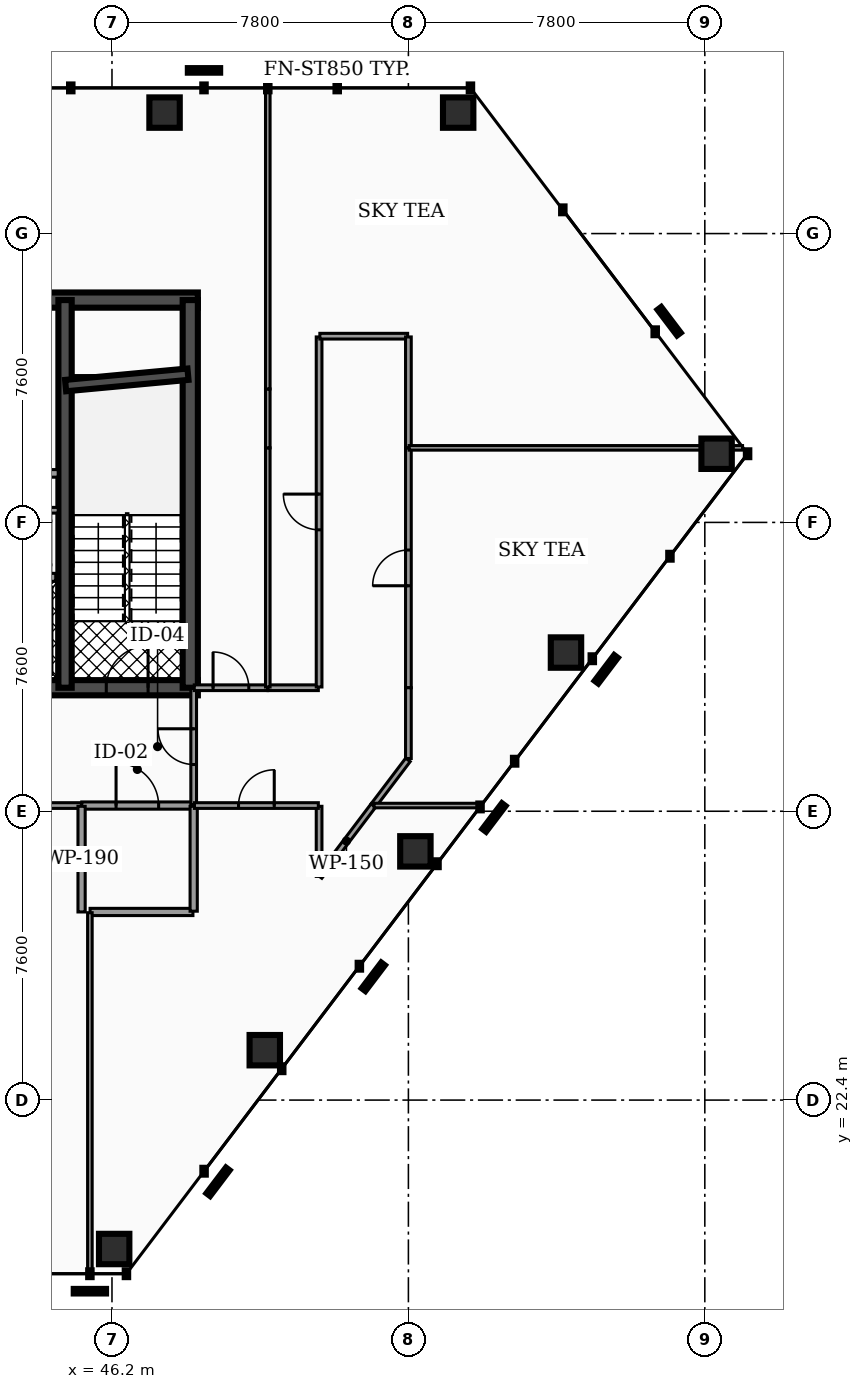
"""IFC4 building model, lengths in metres.
Left out: names, types, materials, properties, quantities, classifications, styles, units other than length and angle.
Written with IfcOpenShell. Run it as: python <this file> out.ifc"""

import sys

from ifc_helpers import new_model, si_unit, direction, frame, frame_2d, origin, origin_2d, place, context, subcontext, project, spatial, rectangle, hollow_rectangle, extrude, element, fill, save


model = new_model("IFC4")
c1 = context("Model", 3, precision=1e-05, world=origin(), true_north=direction((0.0, 1.0)))
c2 = subcontext(c1, "Body", "Model", "MODEL_VIEW")
j1 = project(units=[si_unit("LENGTHUNIT", "METRE"), si_unit("PLANEANGLEUNIT", "RADIAN")], contexts=[c1])
p1 = place(None, origin())
s1 = spatial("IfcSite", under=j1, at=p1, CompositionType="ELEMENT")
p2 = place(p1, origin())
s2 = spatial("IfcBuilding", under=s1, at=p2, CompositionType="ELEMENT")
p3 = place(p2, frame((0.0, 0.0, 149.6)))
s3 = spatial("IfcBuildingStorey", under=s2, at=p3, CompositionType="ELEMENT", Elevation=149.6)
p4 = place(p3, frame((28.4, 43.45, 0.0), z_axis=(0.0, 0.0, 1.0), x_axis=(1.0, 0.0, 0.0)))
e1 = element("IfcWall", 1, at=p4, inside=s3, PredefinedType="SHEAR", context=c2, shape_type="SweptSolid", body=[
    extrude(rectangle(XDim=20.06, YDim=0.4, at=frame_2d((10.03, 0.0))), origin(), (0.0, 0.0, 1.0), 3.5),
])
p5 = place(p3, frame((28.4, 33.25, 0.0), z_axis=(0.0, 0.0, 1.0), x_axis=(1.0, 0.0, 0.0)))
e2 = element("IfcWall", 2, at=p5, inside=s3, PredefinedType="SHEAR", context=c2, shape_type="SweptSolid", body=[
    extrude(rectangle(XDim=20.06, YDim=0.4, at=frame_2d((10.03, 0.0))), origin(), (0.0, 0.0, 1.0), 3.5),
])
p6 = place(p5, frame((4.03, 0.0, 0.0)))
e3 = element("IfcOpeningElement", 3, at=p6, cuts=e2, PredefinedType="OPENING", context=c2, shape_type="SweptSolid", body=[
    extrude(rectangle(XDim=1.1, YDim=2.15, at=frame_2d((0.55, 1.075))), frame((0.0, 0.21, 0.0), z_axis=(0.0, -1.0, 0.0), x_axis=(1.0, 0.0, 0.0)), (0.0, 0.0, 1.0), 0.42),
])
p7 = place(p5, frame((14.87, 0.0, 0.0)))
e4 = element("IfcOpeningElement", 4, at=p7, cuts=e2, PredefinedType="OPENING", context=c2, shape_type="SweptSolid", body=[
    extrude(rectangle(XDim=1.1, YDim=2.15, at=frame_2d((0.55, 1.075))), frame((0.0, 0.21, 0.0), z_axis=(0.0, -1.0, 0.0), x_axis=(1.0, 0.0, 0.0)), (0.0, 0.0, 1.0), 0.42),
])
p8 = place(p5, frame((5.95, 0.0, 0.0)))
e5 = element("IfcOpeningElement", 5, at=p8, cuts=e2, PredefinedType="OPENING", context=c2, shape_type="SweptSolid", body=[
    extrude(rectangle(XDim=1.0, YDim=2.1, at=frame_2d((0.5, 1.05))), frame((0.0, 0.21, 0.0), z_axis=(0.0, -1.0, 0.0), x_axis=(1.0, 0.0, 0.0)), (0.0, 0.0, 1.0), 0.42),
])
p9 = place(p5, frame((7.65, 0.0, 0.0)))
e6 = element("IfcOpeningElement", 6, at=p9, cuts=e2, PredefinedType="OPENING", context=c2, shape_type="SweptSolid", body=[
    extrude(rectangle(XDim=1.0, YDim=2.1, at=frame_2d((0.5, 1.05))), frame((0.0, 0.21, 0.0), z_axis=(0.0, -1.0, 0.0), x_axis=(1.0, 0.0, 0.0)), (0.0, 0.0, 1.0), 0.42),
])
p10 = place(p5, frame((1.31, 0.0, 0.0)))
e7 = element("IfcOpeningElement", 7, at=p10, cuts=e2, PredefinedType="OPENING", context=c2, shape_type="SweptSolid", body=[
    extrude(rectangle(XDim=1.1, YDim=2.2, at=frame_2d((0.55, 1.1))), frame((0.0, 0.21, 0.0), z_axis=(0.0, -1.0, 0.0), x_axis=(1.0, 0.0, 0.0)), (0.0, 0.0, 1.0), 0.42),
])
p11 = place(p5, frame((9.44, 0.0, 0.0)))
e8 = element("IfcOpeningElement", 8, at=p11, cuts=e2, PredefinedType="OPENING", context=c2, shape_type="SweptSolid", body=[
    extrude(rectangle(XDim=1.12, YDim=2.05, at=frame_2d((0.56, 1.025))), frame((0.0, 0.21, 0.0), z_axis=(0.0, -1.0, 0.0), x_axis=(1.0, 0.0, 0.0)), (0.0, 0.0, 1.0), 0.42),
])
p12 = place(p5, frame((17.65, 0.0, 0.0)))
e9 = element("IfcOpeningElement", 9, at=p12, cuts=e2, PredefinedType="OPENING", context=c2, shape_type="SweptSolid", body=[
    extrude(rectangle(XDim=1.1, YDim=2.2, at=frame_2d((0.55, 1.1))), frame((0.0, 0.21, 0.0), z_axis=(0.0, -1.0, 0.0), x_axis=(1.0, 0.0, 0.0)), (0.0, 0.0, 1.0), 0.42),
])
p13 = place(p3, frame((44.965, 33.25, 0.0), z_axis=(0.0, 0.0, 1.0), x_axis=(0.0, 1.0, 0.0)))
e10 = element("IfcWall", 10, at=p13, inside=s3, PredefinedType="SHEAR", context=c2, shape_type="SweptSolid", body=[
    extrude(rectangle(XDim=10.2, YDim=0.35, at=frame_2d((5.1, 0.0))), origin(), (0.0, 0.0, 1.0), 3.5),
])
p14 = place(p3, frame((48.26, 33.25, 0.0), z_axis=(0.0, 0.0, 1.0), x_axis=(0.0, 1.0, 0.0)))
e11 = element("IfcWall", 11, at=p14, inside=s3, PredefinedType="SHEAR", context=c2, shape_type="SweptSolid", body=[
    extrude(rectangle(XDim=10.2, YDim=0.4, at=frame_2d((5.1, 0.0))), origin(), (0.0, 0.0, 1.0), 3.5),
])
p15 = place(p3, frame((44.98, 41.2, 0.0), z_axis=(0.0, 0.0, 1.0), x_axis=(0.995686468965, 0.09278176286, 0.0)))
e12 = element("IfcWall", 12, at=p15, inside=s3, PredefinedType="SHEAR", context=c2, shape_type="SweptSolid", body=[
    extrude(rectangle(XDim=3.234, YDim=0.3, at=frame_2d((1.617, 0.0))), origin(), (0.0, 0.0, 1.0), 3.5),
])
for number, where, z_axis, x_axis in (
    (13, (55.31, 48.383, 0.0), (0.0, 0.0, 1.0), (1.0, 0.0, 0.0)),
    (14, (47.583, 48.383, 0.0), (0.0, 0.0, 1.0), (1.0, 0.0, 0.0)),
    (15, (46.258, 18.481, 0.0), (0.0, 0.0, 1.0), (1.0, 0.0, 0.0)),
    (16, (50.221, 23.713, 0.0), (0.0, 0.0, 1.0), (1.0, 0.0, 0.0)),
    (17, (54.184, 28.944, 0.0), (0.0, 0.0, 1.0), (1.0, 0.0, 0.0)),
    (18, (58.147, 34.176, 0.0), (0.0, 0.0, 1.0), (1.0, 0.0, 0.0)),
    (19, (62.11, 39.407, 0.0), (0.0, 0.0, 1.0), (1.0, 0.0, 0.0)),
):
    element("IfcColumn", number, at=place(p3, frame(where, z_axis=z_axis, x_axis=x_axis)), inside=s3, PredefinedType="COLUMN", context=c2, shape_type="SweptSolid", body=[
        extrude(hollow_rectangle(XDim=0.8, YDim=0.8, WallThickness=0.04, at=origin_2d()), origin(), (0.0, 0.0, 1.0), 3.5),
    ])
p16 = place(p3, frame((42.92, 36.155, 0.0), z_axis=(0.0, 0.0, 1.0), x_axis=(1.0, 0.0, 0.0)))
e20 = element("IfcWall", 20, at=p16, inside=s3, PredefinedType="SOLIDWALL", context=c2, shape_type="SweptSolid", body=[
    extrude(rectangle(XDim=1.8, YDim=0.21, at=frame_2d((0.9, 0.0))), origin(), (0.0, 0.0, 1.0), 2.472),
])
p17 = place(p3, frame((39.25, 38.89, 0.0), z_axis=(0.0, 0.0, 1.0), x_axis=(1.0, 0.0, 0.0)))
e21 = element("IfcWall", 21, at=p17, inside=s3, PredefinedType="PARTITIONING", context=c2, shape_type="SweptSolid", body=[
    extrude(rectangle(XDim=5.535, YDim=0.2, at=frame_2d((2.768, 0.0))), origin(), (0.0, 0.0, 1.0), 2.457),
])
p18 = place(p17, frame((2.327, 0.0, 0.0)))
e22 = element("IfcOpeningElement", 22, at=p18, cuts=e21, PredefinedType="OPENING", context=c2, shape_type="SweptSolid", body=[
    extrude(rectangle(XDim=0.88, YDim=2.05, at=frame_2d((0.44, 1.025))), frame((0.0, 0.11, 0.0), z_axis=(0.0, -1.0, 0.0), x_axis=(1.0, 0.0, 0.0)), (0.0, 0.0, 1.0), 0.22),
])
p19 = place(p3, frame((41.62, 37.92, 0.0), z_axis=(0.0, 0.0, 1.0), x_axis=(1.0, 0.0, 0.0)))
e23 = element("IfcWall", 23, at=p19, inside=s3, PredefinedType="PARTITIONING", context=c2, shape_type="SweptSolid", body=[
    extrude(rectangle(XDim=3.165, YDim=0.15, at=frame_2d((1.583, 0.0))), origin(), (0.0, 0.0, 1.0), 2.457),
])
p20 = place(p19, frame((0.312, 0.0, 0.0)))
e24 = element("IfcOpeningElement", 24, at=p20, cuts=e23, PredefinedType="OPENING", context=c2, shape_type="SweptSolid", body=[
    extrude(rectangle(XDim=0.94, YDim=2.05, at=frame_2d((0.47, 1.025))), frame((0.0, 0.085, 0.0), z_axis=(0.0, -1.0, 0.0), x_axis=(1.0, 0.0, 0.0)), (0.0, 0.0, 1.0), 0.17),
])
p21 = place(p3, frame((45.405, 30.15, 0.0), z_axis=(0.0, 0.0, 1.0), x_axis=(1.0, 0.0, 0.0)))
e25 = element("IfcWall", 25, at=p21, inside=s3, PredefinedType="PARTITIONING", context=c2, shape_type="SweptSolid", body=[
    extrude(rectangle(XDim=2.925, YDim=0.19, at=frame_2d((1.462, 0.0))), origin(), (0.0, 0.0, 1.0), 2.457),
])
p22 = place(p21, frame((0.903, 0.0, 0.0)))
e26 = element("IfcOpeningElement", 26, at=p22, cuts=e25, PredefinedType="OPENING", context=c2, shape_type="SweptSolid", body=[
    extrude(rectangle(XDim=1.12, YDim=2.05, at=frame_2d((0.56, 1.025))), frame((0.0, 0.105, 0.0), z_axis=(0.0, -1.0, 0.0), x_axis=(1.0, 0.0, 0.0)), (0.0, 0.0, 1.0), 0.21),
])
p23 = place(p3, frame((48.35, 30.17, 0.0), z_axis=(0.0, 0.0, 1.0), x_axis=(0.0, 1.0, 0.0)))
e27 = element("IfcWall", 27, at=p23, inside=s3, PredefinedType="PARTITIONING", context=c2, shape_type="SweptSolid", body=[
    extrude(rectangle(XDim=3.06, YDim=0.15, at=frame_2d((1.53, 0.0))), origin(), (0.0, 0.0, 1.0), 2.457),
])
p24 = place(p23, frame((1.06, 0.0, 0.0)))
e28 = element("IfcOpeningElement", 28, at=p24, cuts=e27, PredefinedType="OPENING", context=c2, shape_type="SweptSolid", body=[
    extrude(rectangle(XDim=0.94, YDim=2.05, at=frame_2d((0.47, 1.025))), frame((0.0, 0.085, 0.0), z_axis=(0.0, -1.0, 0.0), x_axis=(1.0, 0.0, 0.0)), (0.0, 0.0, 1.0), 0.17),
])
p25 = place(p3, frame((35.385, 30.15, 0.0), z_axis=(0.0, 0.0, 1.0), x_axis=(1.0, 0.0, 0.0)))
e29 = element("IfcWall", 29, at=p25, inside=s3, PredefinedType="PARTITIONING", context=c2, shape_type="SweptSolid", body=[
    extrude(rectangle(XDim=10.01, YDim=0.15, at=frame_2d((5.005, 0.0))), origin(), (0.0, 0.0, 1.0), 2.457),
])
p26 = place(p25, frame((7.935, 0.0, 0.0)))
e30 = element("IfcOpeningElement", 30, at=p26, cuts=e29, PredefinedType="OPENING", context=c2, shape_type="SweptSolid", body=[
    extrude(rectangle(XDim=0.94, YDim=2.05, at=frame_2d((0.47, 1.025))), frame((0.0, 0.085, 0.0), z_axis=(0.0, -1.0, 0.0), x_axis=(1.0, 0.0, 0.0)), (0.0, 0.0, 1.0), 0.17),
])
p27 = place(p3, frame((45.4, 27.35, 0.0), z_axis=(0.0, 0.0, 1.0), x_axis=(0.0, 1.0, 0.0)))
e31 = element("IfcWall", 31, at=p27, inside=s3, PredefinedType="PARTITIONING", context=c2, shape_type="SweptSolid", body=[
    extrude(rectangle(XDim=2.78, YDim=0.19, at=frame_2d((1.39, 0.0))), origin(), (0.0, 0.0, 1.0), 2.457),
])
p28 = place(p3, frame((45.624, 27.35, 0.0), z_axis=(0.0, 0.0, 1.0), x_axis=(1.0, 0.0, 0.0)))
e32 = element("IfcWall", 32, at=p28, inside=s3, PredefinedType="PARTITIONING", context=c2, shape_type="SweptSolid", body=[
    extrude(rectangle(XDim=2.706, YDim=0.19, at=frame_2d((1.353, 0.0))), origin(), (0.0, 0.0, 1.0), 2.457),
])
p29 = place(p3, frame((48.35, 27.37, 0.0), z_axis=(0.0, 0.0, 1.0), x_axis=(0.0, 1.0, 0.0)))
e33 = element("IfcWall", 33, at=p29, inside=s3, PredefinedType="PARTITIONING", context=c2, shape_type="SweptSolid", body=[
    extrude(rectangle(XDim=2.76, YDim=0.19, at=frame_2d((1.38, 0.0))), origin(), (0.0, 0.0, 1.0), 2.457),
])
p30 = place(p3, frame((51.662, 28.282, 0.0), z_axis=(0.0, 0.0, 1.0), x_axis=(0.603811538878, 0.797127107504, 0.0)))
e34 = element("IfcWall", 34, at=p30, inside=s3, PredefinedType="PARTITIONING", context=c2, shape_type="SweptSolid", body=[
    extrude(rectangle(XDim=2.343, YDim=0.15, at=frame_2d((1.171, 0.0))), origin(), (0.0, 0.0, 1.0), 2.457),
])
p31 = place(p3, frame((51.65, 28.286, 0.0), z_axis=(0.0, 0.0, 1.0), x_axis=(0.0, 1.0, 0.0)))
e35 = element("IfcWall", 35, at=p31, inside=s3, PredefinedType="PARTITIONING", context=c2, shape_type="SweptSolid", body=[
    extrude(rectangle(XDim=1.844, YDim=0.15, at=frame_2d((0.922, 0.0))), origin(), (0.0, 0.0, 1.0), 2.457),
])
p32 = place(p3, frame((48.37, 30.15, 0.0), z_axis=(0.0, 0.0, 1.0), x_axis=(1.0, 0.0, 0.0)))
e36 = element("IfcWall", 36, at=p32, inside=s3, PredefinedType="PARTITIONING", context=c2, shape_type="SweptSolid", body=[
    extrude(rectangle(XDim=3.26, YDim=0.15, at=frame_2d((1.63, 0.0))), origin(), (0.0, 0.0, 1.0), 2.457),
])
p33 = place(p32, frame((1.16, 0.0, 0.0)))
e37 = element("IfcOpeningElement", 37, at=p33, cuts=e36, PredefinedType="OPENING", context=c2, shape_type="SweptSolid", body=[
    extrude(rectangle(XDim=0.94, YDim=2.05, at=frame_2d((0.47, 1.025))), frame((0.0, 0.085, 0.0), z_axis=(0.0, -1.0, 0.0), x_axis=(1.0, 0.0, 0.0)), (0.0, 0.0, 1.0), 0.17),
])
p34 = place(p3, frame((54.0, 33.25, 0.0), z_axis=(0.0, 0.0, 1.0), x_axis=(0.0, 1.0, 0.0)))
e38 = element("IfcWall", 38, at=p34, inside=s3, PredefinedType="PARTITIONING", context=c2, shape_type="SweptSolid", body=[
    extrude(rectangle(XDim=6.307, YDim=0.15, at=frame_2d((3.153, 0.0))), origin(), (0.0, 0.0, 1.0), 2.457),
])
p35 = place(p34, frame((2.683, 0.0, 0.0)))
e39 = element("IfcOpeningElement", 39, at=p35, cuts=e38, PredefinedType="OPENING", context=c2, shape_type="SweptSolid", body=[
    extrude(rectangle(XDim=0.94, YDim=2.05, at=frame_2d((0.47, 1.025))), frame((0.0, 0.085, 0.0), z_axis=(0.0, -1.0, 0.0), x_axis=(1.0, 0.0, 0.0)), (0.0, 0.0, 1.0), 0.17),
])
p36 = place(p3, frame((54.0, 31.388, 0.0), z_axis=(0.0, 0.0, 1.0), x_axis=(0.0, 1.0, 0.0)))
e40 = element("IfcWall", 40, at=p36, inside=s3, PredefinedType="PARTITIONING", context=c2, shape_type="SweptSolid", body=[
    extrude(rectangle(XDim=1.862, YDim=0.15, at=frame_2d((0.931, 0.0))), origin(), (0.0, 0.0, 1.0), 2.457),
])
p37 = place(p3, frame((53.08, 30.154, 0.0), z_axis=(0.0, 0.0, 1.0), x_axis=(0.603892095683, 0.797066080555, 0.0)))
e41 = element("IfcWall", 41, at=p37, inside=s3, PredefinedType="PARTITIONING", context=c2, shape_type="SweptSolid", body=[
    extrude(rectangle(XDim=1.503, YDim=0.15, at=frame_2d((0.751, 0.0))), origin(), (0.0, 0.0, 1.0), 2.457),
])
p38 = place(p3, frame((50.305, 33.25, 0.0), z_axis=(0.0, 0.0, 1.0), x_axis=(1.0, 0.0, 0.0)))
e42 = element("IfcWall", 42, at=p38, inside=s3, PredefinedType="PARTITIONING", context=c2, shape_type="SweptSolid", body=[
    extrude(rectangle(XDim=1.325, YDim=0.15, at=frame_2d((0.663, 0.0))), origin(), (0.0, 0.0, 1.0), 2.457),
])
p39 = place(p3, frame((51.65, 33.27, 0.0), z_axis=(0.0, 0.0, 1.0), x_axis=(0.0, 1.0, 0.0)))
e43 = element("IfcWall", 43, at=p39, inside=s3, PredefinedType="PARTITIONING", context=c2, shape_type="SweptSolid", body=[
    extrude(rectangle(XDim=9.21, YDim=0.15, at=frame_2d((4.605, 0.0))), origin(), (0.0, 0.0, 1.0), 2.457),
])
p40 = place(p39, frame((4.135, 0.0, 0.0)))
e44 = element("IfcOpeningElement", 44, at=p40, cuts=e43, PredefinedType="OPENING", context=c2, shape_type="SweptSolid", body=[
    extrude(rectangle(XDim=0.94, YDim=2.05, at=frame_2d((0.47, 1.025))), frame((0.0, 0.085, 0.0), z_axis=(0.0, -1.0, 0.0), x_axis=(1.0, 0.0, 0.0)), (0.0, 0.0, 1.0), 0.17),
])
p41 = place(p3, frame((51.67, 42.5, 0.0), z_axis=(0.0, 0.0, 1.0), x_axis=(1.0, 0.0, 0.0)))
e45 = element("IfcWall", 45, at=p41, inside=s3, PredefinedType="PARTITIONING", context=c2, shape_type="SweptSolid", body=[
    extrude(rectangle(XDim=2.31, YDim=0.15, at=frame_2d((1.155, 0.0))), origin(), (0.0, 0.0, 1.0), 2.457),
])
p42 = place(p3, frame((54.0, 39.567, 0.0), z_axis=(0.0, 0.0, 1.0), x_axis=(0.0, 1.0, 0.0)))
e46 = element("IfcWall", 46, at=p42, inside=s3, PredefinedType="PARTITIONING", context=c2, shape_type="SweptSolid", body=[
    extrude(rectangle(XDim=2.913, YDim=0.15, at=frame_2d((1.457, 0.0))), origin(), (0.0, 0.0, 1.0), 2.457),
])
p43 = place(p3, frame((48.365, 33.25, 0.0), z_axis=(0.0, 0.0, 1.0), x_axis=(1.0, 0.0, 0.0)))
e47 = element("IfcWall", 47, at=p43, inside=s3, PredefinedType="PARTITIONING", context=c2, shape_type="SweptSolid", body=[
    extrude(rectangle(XDim=1.93, YDim=0.15, at=frame_2d((0.965, 0.0))), origin(), (0.0, 0.0, 1.0), 2.457),
])
p44 = place(p43, frame((0.495, 0.0, 0.0)))
e48 = element("IfcOpeningElement", 48, at=p44, cuts=e47, PredefinedType="OPENING", context=c2, shape_type="SweptSolid", body=[
    extrude(rectangle(XDim=0.94, YDim=2.05, at=frame_2d((0.47, 1.025))), frame((0.0, 0.085, 0.0), z_axis=(0.0, -1.0, 0.0), x_axis=(1.0, 0.0, 0.0)), (0.0, 0.0, 1.0), 0.17),
])
p45 = place(p3, frame((45.619, 17.846, 0.0), z_axis=(0.0, 0.0, 1.0), x_axis=(0.0, 1.0, 0.0)))
e49 = element("IfcWall", 49, at=p45, inside=s3, PredefinedType="PARTITIONING", context=c2, shape_type="SweptSolid", body=[
    extrude(rectangle(XDim=9.484, YDim=0.12, at=frame_2d((4.742, 0.0))), origin(), (0.0, 0.0, 1.0), 2.457),
])
p46 = place(p3, frame((53.097, 30.15, 0.0), z_axis=(0.0, 0.0, 1.0), x_axis=(1.0, 0.0, 0.0)))
e50 = element("IfcWall", 50, at=p46, inside=s3, PredefinedType="PARTITIONING", context=c2, shape_type="SweptSolid", body=[
    extrude(rectangle(XDim=2.8, YDim=0.12, at=frame_2d((1.4, 0.0))), origin(), (0.0, 0.0, 1.0), 2.457),
])
p47 = place(p3, frame((54.02, 39.562, 0.0), z_axis=(0.0, 0.0, 1.0), x_axis=(1.0, 0.0, 0.0)))
e51 = element("IfcWall", 51, at=p47, inside=s3, PredefinedType="PARTITIONING", context=c2, shape_type="SweptSolid", body=[
    extrude(rectangle(XDim=8.773, YDim=0.12, at=frame_2d((4.387, 0.0))), origin(), (0.0, 0.0, 1.0), 2.457),
])
p48 = place(p3, frame((50.3, 33.27, 0.0), z_axis=(0.0, 0.0, 1.0), x_axis=(0.0, 1.0, 0.0)))
e52 = element("IfcWall", 52, at=p48, inside=s3, PredefinedType="PARTITIONING", context=c2, shape_type="SweptSolid", body=[
    extrude(rectangle(XDim=6.292, YDim=0.12, at=frame_2d((3.146, 0.0))), origin(), (0.0, 0.0, 1.0), 2.457),
])
p49 = place(p3, frame((50.3, 39.562, 0.0), z_axis=(0.0, 0.0, 1.0), x_axis=(0.0, 1.0, 0.0)))
e53 = element("IfcWall", 53, at=p49, inside=s3, PredefinedType="PARTITIONING", context=c2, shape_type="SweptSolid", body=[
    extrude(rectangle(XDim=1.55, YDim=0.12, at=frame_2d((0.775, 0.0))), origin(), (0.0, 0.0, 1.0), 2.457),
])
p50 = place(p3, frame((50.3, 41.112, 0.0), z_axis=(0.0, 0.0, 1.0), x_axis=(0.0, 1.0, 0.0)))
e54 = element("IfcWall", 54, at=p50, inside=s3, PredefinedType="PARTITIONING", context=c2, shape_type="SweptSolid", body=[
    extrude(rectangle(XDim=7.907, YDim=0.12, at=frame_2d((3.953, 0.0))), origin(), (0.0, 0.0, 1.0), 2.457),
])
p51 = place(p12, origin())
e55 = element("IfcDoor", 55, at=p51, inside=s3, OperationType="SINGLE_SWING_RIGHT", PredefinedType="DOOR", context=c2, shape_type="SweptSolid", body=[
    extrude(rectangle(XDim=1.1, YDim=2.2, at=frame_2d((0.55, 1.1))), frame((0.0, 0.025, 0.0), z_axis=(0.0, -1.0, 0.0), x_axis=(1.0, 0.0, 0.0)), (0.0, 0.0, 1.0), 0.05),
])
fill(e9, e55)
p52 = place(p22, origin())
e56 = element("IfcDoor", 56, at=p52, inside=s3, OperationType="SINGLE_SWING_LEFT", PredefinedType="DOOR", context=c2, shape_type="SweptSolid", body=[
    extrude(rectangle(XDim=1.12, YDim=2.05, at=frame_2d((0.56, 1.025))), frame((0.0, 0.025, 0.0), z_axis=(0.0, -1.0, 0.0), x_axis=(1.0, 0.0, 0.0)), (0.0, 0.0, 1.0), 0.05),
])
fill(e26, e56)
p53 = place(p24, origin())
e57 = element("IfcDoor", 57, at=p53, inside=s3, OperationType="SINGLE_SWING_RIGHT", PredefinedType="DOOR", context=c2, shape_type="SweptSolid", body=[
    extrude(rectangle(XDim=0.94, YDim=2.05, at=frame_2d((0.47, 1.025))), frame((0.0, 0.025, 0.0), z_axis=(0.0, -1.0, 0.0), x_axis=(1.0, 0.0, 0.0)), (0.0, 0.0, 1.0), 0.05),
])
fill(e28, e57)
p54 = place(p33, origin())
e58 = element("IfcDoor", 58, at=p54, inside=s3, OperationType="SINGLE_SWING_RIGHT", PredefinedType="DOOR", context=c2, shape_type="SweptSolid", body=[
    extrude(rectangle(XDim=0.94, YDim=2.05, at=frame_2d((0.47, 1.025))), frame((0.0, 0.025, 0.0), z_axis=(0.0, -1.0, 0.0), x_axis=(1.0, 0.0, 0.0)), (0.0, 0.0, 1.0), 0.05),
])
fill(e37, e58)
p55 = place(p35, origin())
e59 = element("IfcDoor", 59, at=p55, inside=s3, OperationType="SINGLE_SWING_LEFT", PredefinedType="DOOR", context=c2, shape_type="SweptSolid", body=[
    extrude(rectangle(XDim=0.94, YDim=2.05, at=frame_2d((0.47, 1.025))), frame((0.0, 0.025, 0.0), z_axis=(0.0, -1.0, 0.0), x_axis=(1.0, 0.0, 0.0)), (0.0, 0.0, 1.0), 0.05),
])
fill(e39, e59)
p56 = place(p40, origin())
e60 = element("IfcDoor", 60, at=p56, inside=s3, OperationType="SINGLE_SWING_RIGHT", PredefinedType="DOOR", context=c2, shape_type="SweptSolid", body=[
    extrude(rectangle(XDim=0.94, YDim=2.05, at=frame_2d((0.47, 1.025))), frame((0.0, 0.025, 0.0), z_axis=(0.0, -1.0, 0.0), x_axis=(1.0, 0.0, 0.0)), (0.0, 0.0, 1.0), 0.05),
])
fill(e44, e60)
p57 = place(p44, origin())
e61 = element("IfcDoor", 61, at=p57, inside=s3, OperationType="SINGLE_SWING_LEFT", PredefinedType="DOOR", context=c2, shape_type="SweptSolid", body=[
    extrude(rectangle(XDim=0.94, YDim=2.05, at=frame_2d((0.47, 1.025))), frame((0.0, 0.025, 0.0), z_axis=(0.0, -1.0, 0.0), x_axis=(1.0, 0.0, 0.0)), (0.0, 0.0, 1.0), 0.05),
])
fill(e48, e61)
save(model, sys.argv[1])
